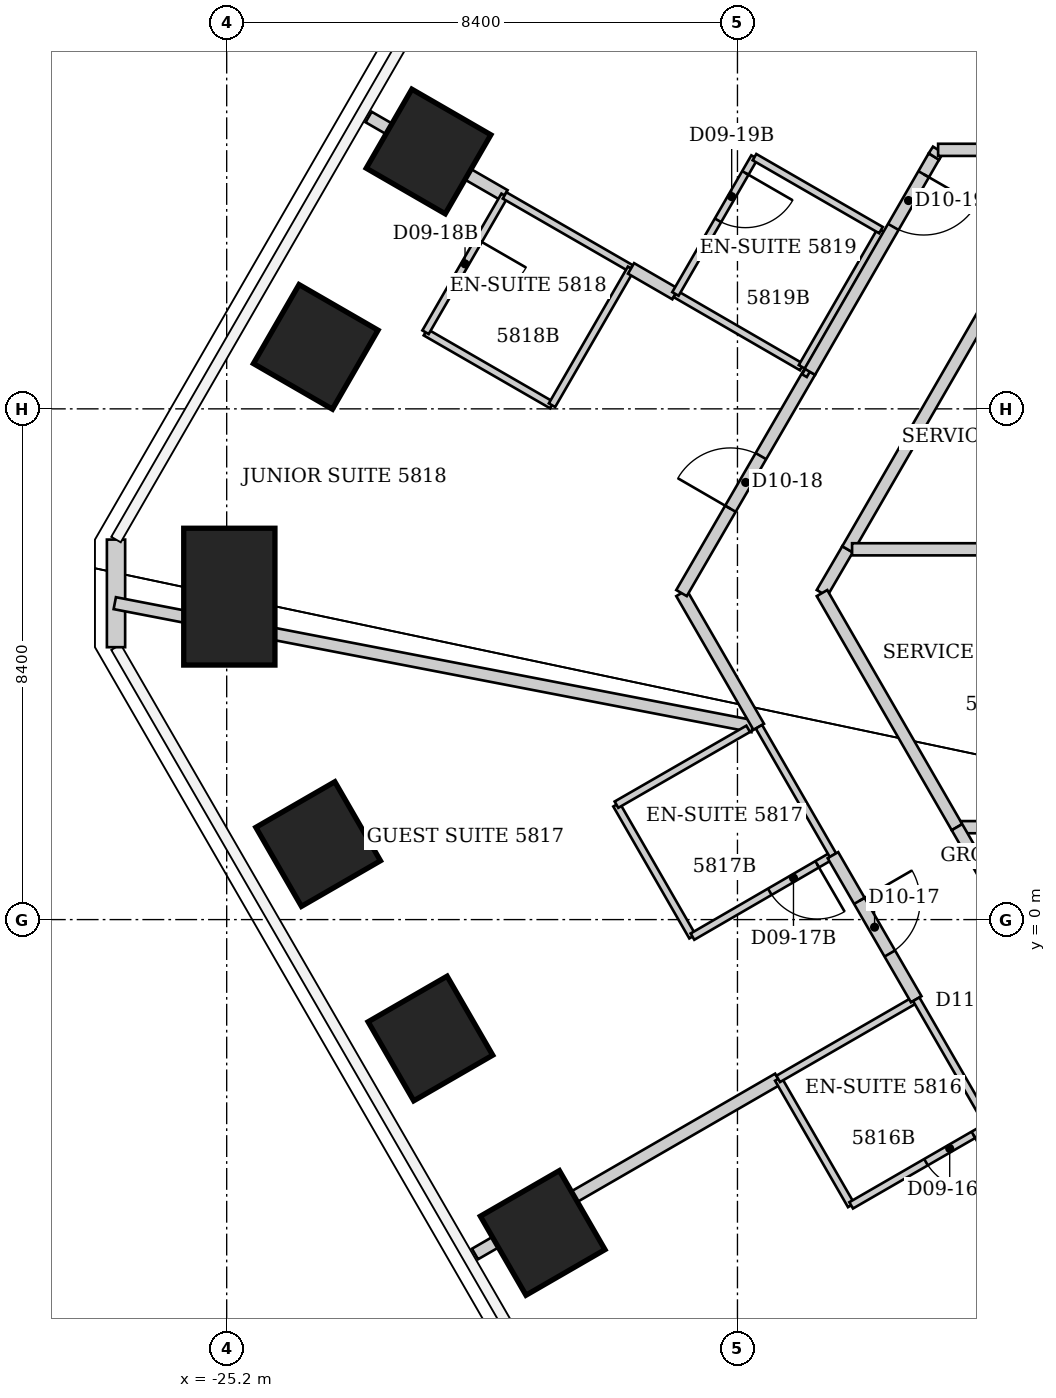
"""IFC4 building model, lengths in metres.
Left out: names, types, materials, properties, quantities, classifications, styles, units other than length and angle.
Written with IfcOpenShell. Run it as: python <this file> out.ifc"""

import sys

from ifc_helpers import new_model, si_unit, direction, frame, frame_2d, origin, origin_2d, place, context, subcontext, project, spatial, rectangle, extrude, element, fill, save


model = new_model("IFC4")
c1 = context("Model", 3, precision=1e-05, world=origin(), true_north=direction((0.0, 1.0)))
c2 = subcontext(c1, "Body", "Model", "MODEL_VIEW")
j1 = project(units=[si_unit("LENGTHUNIT", "METRE"), si_unit("PLANEANGLEUNIT", "RADIAN")], contexts=[c1])
p1 = place(None, origin())
s1 = spatial("IfcSite", under=j1, at=p1, CompositionType="ELEMENT")
p2 = place(p1, origin())
s2 = spatial("IfcBuilding", under=s1, at=p2, CompositionType="ELEMENT")
p3 = place(p2, frame((0.0, 0.0, 232.6)))
s3 = spatial("IfcBuildingStorey", under=s2, at=p3, CompositionType="ELEMENT", Elevation=232.6)
p4 = place(p3, frame((-20.003, -5.153, -0.052), z_axis=(0.054858228661, 0.014110017291, 0.998394452188), x_axis=(-0.86451511653, -0.499636332881, 0.054563249145)))
e1 = element("IfcColumn", 1, at=p4, inside=s3, PredefinedType="COLUMN", context=c2, shape_type="SweptSolid", body=[
    extrude(rectangle(XDim=1.5, YDim=1.5, at=origin_2d()), origin(), (0.0, 0.0, 1.0), 3.858),
])
p5 = place(p3, frame((-21.85, -1.956, -0.06), z_axis=(0.059916592272, 0.005366607316, 0.998188960817), x_axis=(-0.864010481445, -0.500509554821, 0.054553400319)))
e2 = element("IfcColumn", 2, at=p5, inside=s3, PredefinedType="COLUMN", context=c2, shape_type="SweptSolid", body=[
    extrude(rectangle(XDim=1.5, YDim=1.5, at=origin_2d()), origin(), (0.0, 0.0, 1.0), 3.867),
])
p6 = place(p3, frame((-23.696, 1.242, -0.068), z_axis=(0.064946488334, -0.003401658943, 0.997882950235), x_axis=(-0.86374544839, -0.500971680077, 0.05450849609)))
e3 = element("IfcColumn", 3, at=p6, inside=s3, PredefinedType="COLUMN", context=c2, shape_type="SweptSolid", body=[
    extrude(rectangle(XDim=1.5, YDim=1.5, at=origin_2d()), origin(), (0.0, 0.0, 1.0), 3.876),
])
p7 = place(p3, frame((-25.156, 5.311, -0.069), z_axis=(0.069494626315, -0.014666891242, 0.997474500534), x_axis=(-0.997582322762, -0.001100831088, 0.069485951703)))
e4 = element("IfcColumn", 4, at=p7, inside=s3, PredefinedType="COLUMN", context=c2, shape_type="SweptSolid", body=[
    extrude(rectangle(XDim=1.5, YDim=2.25, at=origin_2d()), origin(), (0.0, 0.0, 1.0), 3.878),
])
p8 = place(p3, frame((-23.735, 9.419, -0.059), z_axis=(0.064004664797, -0.025374630423, 0.997626949824), x_axis=(-0.863841955807, 0.499136409128, 0.068116961699)))
e5 = element("IfcColumn", 5, at=p8, inside=s3, PredefinedType="COLUMN", context=c2, shape_type="SweptSolid", body=[
    extrude(rectangle(XDim=1.5, YDim=1.5, at=origin_2d()), origin(), (0.0, 0.0, 1.0), 3.868),
])
p9 = place(p3, frame((-21.88, 12.633, -0.051), z_axis=(0.059073478929, -0.034090583664, 0.99767136683), x_axis=(-0.86410694155, 0.498665569053, 0.068204426596)))
e6 = element("IfcColumn", 6, at=p9, inside=s3, PredefinedType="COLUMN", context=c2, shape_type="SweptSolid", body=[
    extrude(rectangle(XDim=1.5, YDim=1.5, at=origin_2d()), origin(), (0.0, 0.0, 1.0), 3.86),
])
p10 = place(p3, frame((-27.02, 4.48, 0.0), z_axis=(0.0, 0.0, 1.0), x_axis=(0.0, 1.0, 0.0)))
e7 = element("IfcWall", 7, at=p10, inside=s3, PredefinedType="SOLIDWALL", context=c2, shape_type="SweptSolid", body=[
    extrude(rectangle(XDim=1.77, YDim=0.3, at=frame_2d((0.885, 0.0))), origin(), (0.0, 0.0, 1.0), 3.64),
])
p11 = place(p3, frame((-27.041, 5.204, 0.0), z_axis=(0.0, 0.0, 1.0), x_axis=(0.981884490433, -0.18948046719, 0.0)))
e8 = element("IfcWall", 8, at=p11, inside=s3, PredefinedType="PARTITIONING", context=c2, shape_type="SweptSolid", body=[
    extrude(rectangle(XDim=10.684, YDim=0.2, at=frame_2d((5.342, 0.0))), origin(), (0.0, 0.0, 1.0), 3.64),
])
p12 = place(p3, frame((-22.866, 13.2, 0.0), z_axis=(0.0, 0.0, 1.0), x_axis=(0.866187160499, -0.499719724432, 0.0)))
e9 = element("IfcWall", 9, at=p12, inside=s3, PredefinedType="PARTITIONING", context=c2, shape_type="SweptSolid", body=[
    extrude(rectangle(XDim=2.582, YDim=0.2, at=frame_2d((1.291, 0.0))), origin(), (0.0, 0.0, 1.0), 3.64),
])
p13 = place(p3, frame((-21.93, 9.66, 0.0), z_axis=(0.0, 0.0, 1.0), x_axis=(0.866177122335, -0.499737123639, 0.0)))
e10 = element("IfcWall", 10, at=p13, inside=s3, PredefinedType="PARTITIONING", context=c2, shape_type="SweptSolid", body=[
    extrude(rectangle(XDim=2.401, YDim=0.12, at=frame_2d((1.201, 0.0))), origin(), (0.0, 0.0, 1.0), 3.64),
])
p14 = place(p3, frame((-21.116, -5.5, 0.0), z_axis=(0.0, 0.0, 1.0), x_axis=(0.865919350456, 0.50018364478, 0.0)))
e11 = element("IfcWall", 11, at=p14, inside=s3, PredefinedType="PARTITIONING", context=c2, shape_type="SweptSolid", body=[
    extrude(rectangle(XDim=5.758, YDim=0.2, at=frame_2d((2.879, 0.0))), origin(), (0.0, 0.0, 1.0), 3.64),
])
p15 = place(p3, frame((-20.63, 11.91, 0.0), z_axis=(0.0, 0.0, 1.0), x_axis=(-0.500291685314, -0.865856933682, 0.0)))
e12 = element("IfcWall", 12, at=p15, inside=s3, PredefinedType="PARTITIONING", context=c2, shape_type="SweptSolid", body=[
    extrude(rectangle(XDim=2.599, YDim=0.12, at=frame_2d((1.299, 0.0))), origin(), (0.0, 0.0, 1.0), 3.64),
])
p16 = place(p15, frame((0.85, 0.0, 0.0)))
e13 = element("IfcOpeningElement", 13, at=p16, cuts=e12, PredefinedType="OPENING", context=c2, shape_type="SweptSolid", body=[
    extrude(rectangle(XDim=0.9, YDim=2.03, at=frame_2d((0.45, 1.015))), frame((0.0, 0.06, 0.0), z_axis=(0.0, -1.0, 0.0), x_axis=(1.0, 0.0, 0.0)), (0.0, 0.0, 1.0), 0.12),
])
p17 = place(p3, frame((-20.63, 11.91, 0.0), z_axis=(0.0, 0.0, 1.0), x_axis=(0.866177122335, -0.499737123639, 0.0)))
e14 = element("IfcWall", 14, at=p17, inside=s3, PredefinedType="PARTITIONING", context=c2, shape_type="SweptSolid", body=[
    extrude(rectangle(XDim=2.401, YDim=0.12, at=frame_2d((1.201, 0.0))), origin(), (0.0, 0.0, 1.0), 2.878),
])
p18 = place(p3, frame((-19.85, 8.46, 0.0), z_axis=(0.0, 0.0, 1.0), x_axis=(0.500291685314, 0.865856933682, 0.0)))
e15 = element("IfcWall", 15, at=p18, inside=s3, PredefinedType="PARTITIONING", context=c2, shape_type="SweptSolid", body=[
    extrude(rectangle(XDim=2.599, YDim=0.12, at=frame_2d((1.299, 0.0))), origin(), (0.0, 0.0, 1.0), 3.64),
])
p19 = place(p3, frame((-18.79, 1.89, 0.0), z_axis=(0.0, 0.0, 1.0), x_axis=(0.499159685399, -0.866510016372, 0.0)))
e16 = element("IfcWall", 16, at=p19, inside=s3, PredefinedType="PARTITIONING", context=c2, shape_type="SweptSolid", body=[
    extrude(rectangle(XDim=2.504, YDim=0.12, at=frame_2d((1.252, 0.0))), origin(), (0.0, 0.0, 1.0), 3.64),
])
p20 = place(p3, frame((-18.55, 10.71, 0.0), z_axis=(0.0, 0.0, 1.0), x_axis=(0.865717170405, -0.500533496247, 0.0)))
e17 = element("IfcWall", 17, at=p20, inside=s3, PredefinedType="PARTITIONING", context=c2, shape_type="SweptSolid", body=[
    extrude(rectangle(XDim=0.842, YDim=0.2, at=frame_2d((0.421, 0.0))), origin(), (0.0, 0.0, 1.0), 2.878),
])
p21 = place(p3, frame((-17.82, 10.29, 0.0), z_axis=(0.0, 0.0, 1.0), x_axis=(0.86531257009, -0.501232636652, 0.0)))
e18 = element("IfcWall", 18, at=p21, inside=s3, PredefinedType="PARTITIONING", context=c2, shape_type="SweptSolid", body=[
    extrude(rectangle(XDim=2.401, YDim=0.12, at=frame_2d((1.201, 0.0))), origin(), (0.0, 0.0, 1.0), 2.878),
])
p22 = place(p3, frame((-17.72, 5.37, 0.0), z_axis=(0.0, 0.0, 1.0), x_axis=(0.499922110319, -0.866070368743, 0.0)))
e19 = element("IfcWall", 19, at=p22, inside=s3, PredefinedType="PARTITIONING", context=c2, shape_type="SweptSolid", body=[
    extrude(rectangle(XDim=2.541, YDim=0.2, at=frame_2d((1.27, 0.0))), origin(), (0.0, 0.0, 1.0), 3.64),
])
p23 = place(p3, frame((-17.72, 5.37, 0.0), z_axis=(0.0, 0.0, 1.0), x_axis=(0.501491408171, 0.865162624904, 0.0)))
e20 = element("IfcWall", 20, at=p23, inside=s3, PredefinedType="PARTITIONING", context=c2, shape_type="SweptSolid", body=[
    extrude(rectangle(XDim=4.207, YDim=0.2, at=frame_2d((2.104, 0.0))), origin(), (0.0, 0.0, 1.0), 3.64),
])
p24 = place(p23, frame((1.604, 0.0, 0.0)))
e21 = element("IfcOpeningElement", 21, at=p24, cuts=e20, PredefinedType="OPENING", context=c2, shape_type="SweptSolid", body=[
    extrude(rectangle(XDim=1.0, YDim=2.13, at=frame_2d((0.5, 1.065))), frame((0.0, 0.1, 0.0), z_axis=(0.0, -1.0, 0.0), x_axis=(1.0, 0.0, 0.0)), (0.0, 0.0, 1.0), 0.2),
])
p25 = place(p3, frame((-17.54, -0.28, 0.0), z_axis=(0.0, 0.0, 1.0), x_axis=(0.86498992408, 0.501789229896, 0.0)))
e22 = element("IfcWall", 22, at=p25, inside=s3, PredefinedType="PARTITIONING", context=c2, shape_type="SweptSolid", body=[
    extrude(rectangle(XDim=2.671, YDim=0.12, at=frame_2d((1.335, 0.0))), origin(), (0.0, 0.0, 1.0), 3.64),
])
p26 = place(p25, frame((1.47, 0.0, 0.0)))
e23 = element("IfcOpeningElement", 23, at=p26, cuts=e22, PredefinedType="OPENING", context=c2, shape_type="SweptSolid", body=[
    extrude(rectangle(XDim=0.9, YDim=2.03, at=frame_2d((0.45, 1.015))), frame((0.0, 0.06, 0.0), z_axis=(0.0, -1.0, 0.0), x_axis=(1.0, 0.0, 0.0)), (0.0, 0.0, 1.0), 0.12),
])
p27 = place(p3, frame((-16.624, 3.138, 0.0), z_axis=(0.0, 0.0, 1.0), x_axis=(-0.866525185869, -0.499133351175, 0.0)))
e24 = element("IfcWall", 24, at=p27, inside=s3, PredefinedType="PARTITIONING", context=c2, shape_type="SweptSolid", body=[
    extrude(rectangle(XDim=2.5, YDim=0.12, at=frame_2d((1.25, 0.0))), origin(), (0.0, 0.0, 1.0), 3.038),
])
p28 = place(p3, frame((-16.52, 12.54, 0.0), z_axis=(0.0, 0.0, 1.0), x_axis=(-0.500291685314, -0.865856933682, 0.0)))
e25 = element("IfcWall", 25, at=p28, inside=s3, PredefinedType="PARTITIONING", context=c2, shape_type="SweptSolid", body=[
    extrude(rectangle(XDim=2.599, YDim=0.12, at=frame_2d((1.299, 0.0))), origin(), (0.0, 0.0, 1.0), 3.64),
])
p29 = place(p28, frame((0.3, 0.0, 0.0)))
e26 = element("IfcOpeningElement", 26, at=p29, cuts=e25, PredefinedType="OPENING", context=c2, shape_type="SweptSolid", body=[
    extrude(rectangle(XDim=0.9, YDim=2.03, at=frame_2d((0.45, 1.015))), frame((0.0, 0.06, 0.0), z_axis=(0.0, -1.0, 0.0), x_axis=(1.0, 0.0, 0.0)), (0.0, 0.0, 1.0), 0.12),
])
p30 = place(p3, frame((-16.447, 3.172, 0.0), z_axis=(0.0, 0.0, 1.0), x_axis=(0.499242543719, -0.86646227993, 0.0)))
e27 = element("IfcWall", 27, at=p30, inside=s3, PredefinedType="PARTITIONING", context=c2, shape_type="SweptSolid", body=[
    extrude(rectangle(XDim=2.437, YDim=0.12, at=frame_2d((1.219, 0.0))), origin(), (0.0, 0.0, 1.0), 3.64),
])
p31 = place(p3, frame((-16.13, -2.62, 0.0), z_axis=(0.0, 0.0, 1.0), x_axis=(0.499737123639, -0.866177122335, 0.0)))
e28 = element("IfcWall", 28, at=p31, inside=s3, PredefinedType="PARTITIONING", context=c2, shape_type="SweptSolid", body=[
    extrude(rectangle(XDim=2.401, YDim=0.12, at=frame_2d((1.201, 0.0))), origin(), (0.0, 0.0, 1.0), 3.64),
])
p32 = place(p3, frame((-16.13, -2.62, 0.0), z_axis=(0.0, 0.0, 1.0), x_axis=(0.866114241029, 0.499846097802, 0.0)))
e29 = element("IfcWall", 29, at=p32, inside=s3, PredefinedType="PARTITIONING", context=c2, shape_type="SweptSolid", body=[
    extrude(rectangle(XDim=2.621, YDim=0.12, at=frame_2d((1.311, 0.0))), origin(), (0.0, 0.0, 1.0), 3.64),
])
p33 = place(p3, frame((-15.74, 9.09, 0.0), z_axis=(0.0, 0.0, 1.0), x_axis=(0.500291685314, 0.865856933682, 0.0)))
e30 = element("IfcWall", 30, at=p33, inside=s3, PredefinedType="PARTITIONING", context=c2, shape_type="SweptSolid", body=[
    extrude(rectangle(XDim=2.599, YDim=0.12, at=frame_2d((1.299, 0.0))), origin(), (0.0, 0.0, 1.0), 3.64),
])
p34 = place(p3, frame((-15.686, 9.054, 0.0), z_axis=(0.0, 0.0, 1.0), x_axis=(0.86478894661, -0.502135517387, 0.0)))
e31 = element("IfcWall", 31, at=p34, inside=s3, PredefinedType="PARTITIONING", context=c2, shape_type="SweptSolid", body=[
    extrude(rectangle(XDim=0.087, YDim=0.2, at=frame_2d((0.044, 0.0))), origin(), (0.0, 0.0, 1.0), 3.64),
])
p35 = place(p3, frame((-15.61, 9.01, 0.0), z_axis=(0.0, 0.0, 1.0), x_axis=(0.499301665038, 0.866428212428, 0.0)))
e32 = element("IfcWall", 32, at=p35, inside=s3, PredefinedType="PARTITIONING", context=c2, shape_type="SweptSolid", body=[
    extrude(rectangle(XDim=4.086, YDim=0.2, at=frame_2d((2.043, 0.0))), origin(), (0.0, 0.0, 1.0), 3.64),
])
p36 = place(p35, frame((2.75, 0.0, 0.0)))
e33 = element("IfcOpeningElement", 33, at=p36, cuts=e32, PredefinedType="OPENING", context=c2, shape_type="SweptSolid", body=[
    extrude(rectangle(XDim=1.0, YDim=2.13, at=frame_2d((0.5, 1.065))), frame((0.0, 0.1, 0.0), z_axis=(0.0, -1.0, 0.0), x_axis=(1.0, 0.0, 0.0)), (0.0, 0.0, 1.0), 0.2),
])
p37 = place(p3, frame((-15.41, 5.37, 0.0), z_axis=(0.0, 0.0, 1.0), x_axis=(0.503943891868, 0.863736391412, 0.0)))
e34 = element("IfcWall", 34, at=p37, inside=s3, PredefinedType="PARTITIONING", context=c2, shape_type="SweptSolid", body=[
    extrude(rectangle(XDim=0.833, YDim=0.2, at=frame_2d((0.417, 0.0))), origin(), (0.0, 0.0, 1.0), 3.64),
])
p38 = place(p3, frame((-15.23, 1.06, 0.0), z_axis=(0.0, 0.0, 1.0), x_axis=(0.500406860043, -0.865790375565, 0.0)))
e35 = element("IfcWall", 35, at=p38, inside=s3, PredefinedType="PARTITIONING", context=c2, shape_type="SweptSolid", body=[
    extrude(rectangle(XDim=2.738, YDim=0.2, at=frame_2d((1.369, 0.0))), origin(), (0.0, 0.0, 1.0), 3.64),
])
p39 = place(p38, frame((0.869, 0.0, 0.0)))
e36 = element("IfcOpeningElement", 36, at=p39, cuts=e35, PredefinedType="OPENING", context=c2, shape_type="SweptSolid", body=[
    extrude(rectangle(XDim=1.0, YDim=2.13, at=frame_2d((0.5, 1.065))), frame((0.0, 0.1, 0.0), z_axis=(0.0, -1.0, 0.0), x_axis=(1.0, 0.0, 0.0)), (0.0, 0.0, 1.0), 0.2),
])
p40 = place(p3, frame((-14.99, 6.09, 0.0), z_axis=(0.0, 0.0, 1.0), x_axis=(0.500213626659, 0.86590203124, 0.0)))
e37 = element("IfcWall", 37, at=p40, inside=s3, PredefinedType="PARTITIONING", context=c2, shape_type="SweptSolid", body=[
    extrude(rectangle(XDim=5.278, YDim=0.2, at=frame_2d((2.639, 0.0))), origin(), (0.0, 0.0, 1.0), 3.64),
])
p41 = place(p3, frame((-14.93, -4.7, 0.0), z_axis=(0.0, 0.0, 1.0), x_axis=(0.866114241029, 0.499846097802, 0.0)))
e38 = element("IfcWall", 38, at=p41, inside=s3, PredefinedType="PARTITIONING", context=c2, shape_type="SweptSolid", body=[
    extrude(rectangle(XDim=2.621, YDim=0.12, at=frame_2d((1.311, 0.0))), origin(), (0.0, 0.0, 1.0), 3.64),
])
p42 = place(p41, frame((1.421, 0.0, 0.0)))
e39 = element("IfcOpeningElement", 39, at=p42, cuts=e38, PredefinedType="OPENING", context=c2, shape_type="SweptSolid", body=[
    extrude(rectangle(XDim=0.9, YDim=2.03, at=frame_2d((0.45, 1.015))), frame((0.0, 0.06, 0.0), z_axis=(0.0, -1.0, 0.0), x_axis=(1.0, 0.0, 0.0)), (0.0, 0.0, 1.0), 0.12),
])
p43 = place(p3, frame((-14.915, 6.09, 0.0), z_axis=(0.0, 0.0, 1.0), x_axis=(1.0, 0.0, 0.0)))
e40 = element("IfcWall", 40, at=p43, inside=s3, PredefinedType="PARTITIONING", context=c2, shape_type="SweptSolid", body=[
    extrude(rectangle(XDim=4.355, YDim=0.2, at=frame_2d((2.177, 0.0))), origin(), (0.0, 0.0, 1.0), 3.64),
])
for number, where, z_axis, x_axis in (
    (41, (-14.44, 11.34, 0.0), (0.0, 0.0, 1.0), (-0.866, 0.5, 0.0)),
    (42, (-13.86, -1.31, 0.0), (0.0, 0.0, 1.0), (0.5, -0.866, 0.0)),
):
    element("IfcWall", number, at=place(p3, frame(where, z_axis=z_axis, x_axis=x_axis)), inside=s3, PredefinedType="PARTITIONING", context=c2, shape_type="SweptSolid", body=[
        extrude(rectangle(XDim=2.401, YDim=0.12, at=frame_2d((1.201, 0.0))), origin(), (0.0, 0.0, 1.0), 3.64),
    ])
p44 = place(p3, frame((-13.5, 12.66, 0.0), z_axis=(0.0, 0.0, 1.0), x_axis=(-0.537723852201, -0.843121022614, 0.0)))
e43 = element("IfcWall", 43, at=p44, inside=s3, PredefinedType="PARTITIONING", context=c2, shape_type="SweptSolid", body=[
    extrude(rectangle(XDim=0.13, YDim=0.2, at=frame_2d((0.065, 0.0))), origin(), (0.0, 0.0, 1.0), 3.64),
])
p45 = place(p3, frame((-13.19, 1.52, 0.0), z_axis=(0.0, 0.0, 1.0), x_axis=(-0.499513190454, 0.866306281036, 0.0)))
e44 = element("IfcWall", 44, at=p45, inside=s3, PredefinedType="PARTITIONING", context=c2, shape_type="SweptSolid", body=[
    extrude(rectangle(XDim=4.444, YDim=0.2, at=frame_2d((2.222, 0.0))), origin(), (0.0, 0.0, 1.0), 3.64),
])
p46 = place(p3, frame((-11.025, 12.736, 0.0), z_axis=(0.0, 0.0, 1.0), x_axis=(-0.654431245438, 0.756121514702, 0.0)))
e45 = element("IfcWall", 45, at=p46, inside=s3, PredefinedType="PARTITIONING", context=c2, shape_type="SweptSolid", body=[
    extrude(rectangle(XDim=10.688, YDim=0.2, at=frame_2d((5.344, 0.0))), origin(), (0.0, 0.0, 1.0), 3.64),
])
p47 = place(p3, frame((-10.96, 12.66, 0.0), z_axis=(0.0, 0.0, 1.0), x_axis=(-1.0, 0.0, 0.0)))
e46 = element("IfcWall", 46, at=p47, inside=s3, PredefinedType="PARTITIONING", context=c2, shape_type="SweptSolid", body=[
    extrude(rectangle(XDim=2.54, YDim=0.2, at=frame_2d((1.27, 0.0))), origin(), (0.0, 0.0, 1.0), 3.64),
])
p48 = place(p3, frame((-10.56, 1.52, 0.0), z_axis=(0.0, 0.0, 1.0), x_axis=(-1.0, 0.0, 0.0)))
e47 = element("IfcWall", 47, at=p48, inside=s3, PredefinedType="PARTITIONING", context=c2, shape_type="SweptSolid", body=[
    extrude(rectangle(XDim=2.56, YDim=0.2, at=frame_2d((1.28, 0.0))), origin(), (0.0, 0.0, 1.0), 3.64),
])
p49 = place(p3, frame((-10.55, -3.05, 0.0), z_axis=(0.0, 0.0, 1.0), x_axis=(-0.500193590286, 0.865913605527, 0.0)))
e48 = element("IfcWall", 48, at=p49, inside=s3, PredefinedType="PARTITIONING", context=c2, shape_type="SweptSolid", body=[
    extrude(rectangle(XDim=5.278, YDim=0.2, at=frame_2d((2.639, 0.0))), origin(), (0.0, 0.0, 1.0), 3.64),
])
p50 = place(p49, frame((2.25, 0.0, 0.0)))
e49 = element("IfcOpeningElement", 49, at=p50, cuts=e48, PredefinedType="OPENING", context=c2, shape_type="SweptSolid", body=[
    extrude(rectangle(XDim=1.1, YDim=2.2, at=frame_2d((0.55, 1.1))), frame((0.0, 0.1, 0.0), z_axis=(0.0, -1.0, 0.0), x_axis=(1.0, 0.0, 0.0)), (0.0, 0.0, 1.0), 0.2),
])
p51 = place(p42, origin())
e50 = element("IfcDoor", 50, at=p51, inside=s3, OperationType="SINGLE_SWING_RIGHT", PredefinedType="DOOR", context=c2, shape_type="SweptSolid", body=[
    extrude(rectangle(XDim=0.9, YDim=2.03, at=frame_2d((0.45, 1.015))), frame((0.0, 0.025, 0.0), z_axis=(0.0, -1.0, 0.0), x_axis=(1.0, 0.0, 0.0)), (0.0, 0.0, 1.0), 0.05),
])
fill(e39, e50)
p52 = place(p39, origin())
e51 = element("IfcDoor", 51, at=p52, inside=s3, OperationType="SINGLE_SWING_LEFT", PredefinedType="DOOR", context=c2, shape_type="SweptSolid", body=[
    extrude(rectangle(XDim=1.0, YDim=2.13, at=frame_2d((0.5, 1.065))), frame((0.0, 0.025, 0.0), z_axis=(0.0, -1.0, 0.0), x_axis=(1.0, 0.0, 0.0)), (0.0, 0.0, 1.0), 0.05),
])
fill(e36, e51)
p53 = place(p26, origin())
e52 = element("IfcDoor", 52, at=p53, inside=s3, OperationType="SINGLE_SWING_RIGHT", PredefinedType="DOOR", context=c2, shape_type="SweptSolid", body=[
    extrude(rectangle(XDim=0.9, YDim=2.03, at=frame_2d((0.45, 1.015))), frame((0.0, 0.025, 0.0), z_axis=(0.0, -1.0, 0.0), x_axis=(1.0, 0.0, 0.0)), (0.0, 0.0, 1.0), 0.05),
])
fill(e23, e52)
p54 = place(p24, origin())
e53 = element("IfcDoor", 53, at=p54, inside=s3, OperationType="SINGLE_SWING_LEFT", PredefinedType="DOOR", context=c2, shape_type="SweptSolid", body=[
    extrude(rectangle(XDim=1.0, YDim=2.13, at=frame_2d((0.5, 1.065))), frame((0.0, 0.025, 0.0), z_axis=(0.0, -1.0, 0.0), x_axis=(1.0, 0.0, 0.0)), (0.0, 0.0, 1.0), 0.05),
])
fill(e21, e53)
p55 = place(p16, origin())
e54 = element("IfcDoor", 54, at=p55, inside=s3, OperationType="SINGLE_SWING_LEFT", PredefinedType="DOOR", context=c2, shape_type="SweptSolid", body=[
    extrude(rectangle(XDim=0.9, YDim=2.03, at=frame_2d((0.45, 1.015))), frame((0.0, 0.025, 0.0), z_axis=(0.0, -1.0, 0.0), x_axis=(1.0, 0.0, 0.0)), (0.0, 0.0, 1.0), 0.05),
])
fill(e13, e54)
p56 = place(p36, origin())
e55 = element("IfcDoor", 55, at=p56, inside=s3, OperationType="SINGLE_SWING_RIGHT", PredefinedType="DOOR", context=c2, shape_type="SweptSolid", body=[
    extrude(rectangle(XDim=1.0, YDim=2.13, at=frame_2d((0.5, 1.065))), frame((0.0, 0.025, 0.0), z_axis=(0.0, -1.0, 0.0), x_axis=(1.0, 0.0, 0.0)), (0.0, 0.0, 1.0), 0.05),
])
fill(e33, e55)
p57 = place(p29, origin())
e56 = element("IfcDoor", 56, at=p57, inside=s3, OperationType="SINGLE_SWING_LEFT", PredefinedType="DOOR", context=c2, shape_type="SweptSolid", body=[
    extrude(rectangle(XDim=0.9, YDim=2.03, at=frame_2d((0.45, 1.015))), frame((0.0, 0.025, 0.0), z_axis=(0.0, -1.0, 0.0), x_axis=(1.0, 0.0, 0.0)), (0.0, 0.0, 1.0), 0.05),
])
fill(e26, e56)
save(model, sys.argv[1])
